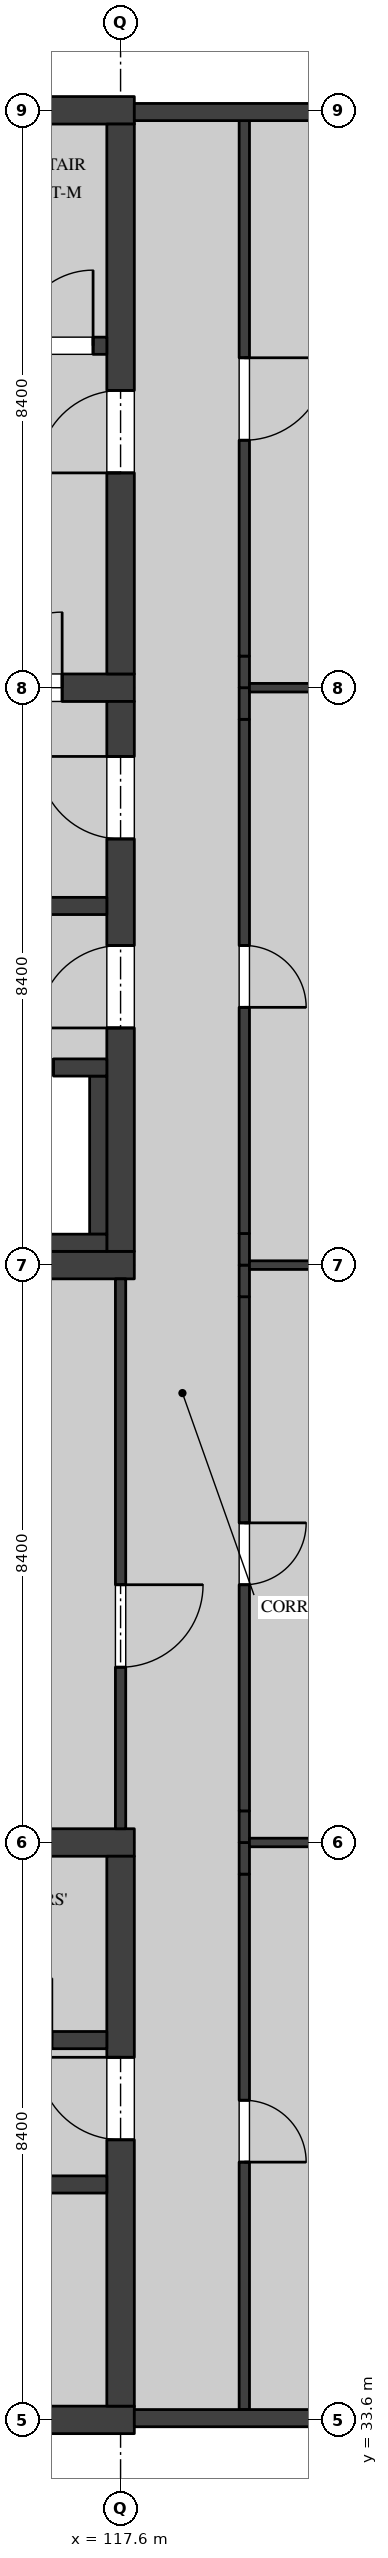
"""IFC4 building model, lengths in metres.
Left out: names, types, materials, properties, quantities, classifications, styles, units other than length and angle.
Written with IfcOpenShell. Run it as: python <this file> out.ifc"""

import sys

from ifc_helpers import new_model, si_unit, direction, frame, frame_2d, origin, place, context, subcontext, project, spatial, rectangle, extrude, element, fill, save


model = new_model("IFC4")
c1 = context("Model", 3, precision=1e-05, world=origin(), true_north=direction((0.0, 1.0)))
c2 = subcontext(c1, "Body", "Model", "MODEL_VIEW")
j1 = project(units=[si_unit("LENGTHUNIT", "METRE"), si_unit("PLANEANGLEUNIT", "RADIAN")], contexts=[c1])
p1 = place(None, origin())
s1 = spatial("IfcSite", under=j1, at=p1, CompositionType="ELEMENT")
p2 = place(p1, origin())
s2 = spatial("IfcBuilding", under=s1, at=p2, CompositionType="ELEMENT")
p3 = place(p2, frame((0.0, 0.0, 36.9)))
s3 = spatial("IfcBuildingStorey", under=s2, at=p3, CompositionType="ELEMENT", Elevation=36.9)
p4 = place(p3, frame((109.0, 50.4, 0.0), z_axis=(0.0, 0.0, 1.0), x_axis=(1.0, 0.0, 0.0)))
e1 = element("IfcWall", 1, at=p4, inside=s3, PredefinedType="SHEAR", context=c2, shape_type="SweptSolid", body=[
    extrude(rectangle(XDim=8.8, YDim=0.4, at=frame_2d((4.4, 0.0))), origin(), (0.0, 0.0, 1.0), 4.37),
])
p5 = place(p3, frame((109.0, 58.8, 0.0), z_axis=(0.0, 0.0, 1.0), x_axis=(1.0, 0.0, 0.0)))
e2 = element("IfcWall", 2, at=p5, inside=s3, PredefinedType="SHEAR", context=c2, shape_type="SweptSolid", body=[
    extrude(rectangle(XDim=8.8, YDim=0.4, at=frame_2d((4.4, 0.0))), origin(), (0.0, 0.0, 1.0), 4.37),
])
p6 = place(p5, frame((6.65, 0.0, 0.0)))
e3 = element("IfcOpeningElement", 3, at=p6, cuts=e2, PredefinedType="OPENING", context=c2, shape_type="SweptSolid", body=[
    extrude(rectangle(XDim=1.1, YDim=2.1, at=frame_2d((0.55, 1.05))), frame((0.0, 0.21, 0.0), z_axis=(0.0, -1.0, 0.0), x_axis=(1.0, 0.0, 0.0)), (0.0, 0.0, 1.0), 0.42),
])
p7 = place(p3, frame((117.6, 50.6, 0.0), z_axis=(0.0, 0.0, 1.0), x_axis=(0.0, 1.0, 0.0)))
e4 = element("IfcWall", 4, at=p7, inside=s3, PredefinedType="SHEAR", context=c2, shape_type="SweptSolid", body=[
    extrude(rectangle(XDim=8.0, YDim=0.4, at=frame_2d((4.0, 0.0))), origin(), (0.0, 0.0, 1.0), 4.37),
])
p8 = place(p7, frame((3.25, 0.0, 0.0)))
e5 = element("IfcOpeningElement", 5, at=p8, cuts=e4, PredefinedType="OPENING", context=c2, shape_type="SweptSolid", body=[
    extrude(rectangle(XDim=1.2, YDim=2.1, at=frame_2d((0.6, 1.05))), frame((0.0, 0.21, 0.0), z_axis=(0.0, -1.0, 0.0), x_axis=(1.0, 0.0, 0.0)), (0.0, 0.0, 1.0), 0.42),
])
p9 = place(p7, frame((6.0, 0.0, 0.0)))
e6 = element("IfcOpeningElement", 6, at=p9, cuts=e4, PredefinedType="OPENING", context=c2, shape_type="SweptSolid", body=[
    extrude(rectangle(XDim=1.2, YDim=2.1, at=frame_2d((0.6, 1.05))), frame((0.0, 0.21, 0.0), z_axis=(0.0, -1.0, 0.0), x_axis=(1.0, 0.0, 0.0)), (0.0, 0.0, 1.0), 0.42),
])
p10 = place(p3, frame((114.75, 55.625, 0.0), z_axis=(0.0, 0.0, 1.0), x_axis=(1.0, 0.0, 0.0)))
e7 = element("IfcWall", 7, at=p10, inside=s3, PredefinedType="SOLIDWALL", context=c2, shape_type="SweptSolid", body=[
    extrude(rectangle(XDim=2.65, YDim=0.25, at=frame_2d((1.325, 0.0))), origin(), (0.0, 0.0, 1.0), 4.37),
])
p11 = place(p3, frame((109.0, 67.2, 0.0), z_axis=(0.0, 0.0, 1.0), x_axis=(1.0, 0.0, 0.0)))
e8 = element("IfcWall", 8, at=p11, inside=s3, PredefinedType="SHEAR", context=c2, shape_type="SweptSolid", body=[
    extrude(rectangle(XDim=8.8, YDim=0.4, at=frame_2d((4.4, 0.0))), origin(), (0.0, 0.0, 1.0), 4.37),
])
p12 = place(p3, frame((117.6, 59.0, 0.0), z_axis=(0.0, 0.0, 1.0), x_axis=(0.0, 1.0, 0.0)))
e9 = element("IfcWall", 9, at=p12, inside=s3, PredefinedType="SHEAR", context=c2, shape_type="SweptSolid", body=[
    extrude(rectangle(XDim=8.0, YDim=0.4, at=frame_2d((4.0, 0.0))), origin(), (0.0, 0.0, 1.0), 4.37),
])
p13 = place(p12, frame((2.925, 0.0, 0.0)))
e10 = element("IfcOpeningElement", 10, at=p13, cuts=e9, PredefinedType="OPENING", context=c2, shape_type="SweptSolid", body=[
    extrude(rectangle(XDim=1.2, YDim=2.1, at=frame_2d((0.6, 1.05))), frame((0.0, 0.21, 0.0), z_axis=(0.0, -1.0, 0.0), x_axis=(1.0, 0.0, 0.0)), (0.0, 0.0, 1.0), 0.42),
])
p14 = place(p3, frame((117.4, 63.775, 0.0), z_axis=(0.0, 0.0, 1.0), x_axis=(-1.0, 0.0, 0.0)))
e11 = element("IfcWall", 11, at=p14, inside=s3, PredefinedType="SOLIDWALL", context=c2, shape_type="SweptSolid", body=[
    extrude(rectangle(XDim=8.0, YDim=0.25, at=frame_2d((4.0, 0.0))), origin(), (0.0, 0.0, 1.0), 4.37),
])
p15 = place(p14, frame((0.2, 0.0, 0.0)))
e12 = element("IfcOpeningElement", 12, at=p15, cuts=e11, PredefinedType="OPENING", context=c2, shape_type="SweptSolid", body=[
    extrude(rectangle(XDim=1.1, YDim=2.1, at=frame_2d((0.55, 1.05))), frame((0.0, 0.135, 0.0), z_axis=(0.0, -1.0, 0.0), x_axis=(1.0, 0.0, 0.0)), (0.0, 0.0, 1.0), 0.27),
])
for number, where, z_axis, x_axis in (
    (13, (109.0, 33.6, 0.0), (0.0, 0.0, 1.0), (1.0, 0.0, 0.0)),
    (14, (109.0, 42.0, 0.0), (0.0, 0.0, 1.0), (1.0, 0.0, 0.0)),
):
    element("IfcWall", number, at=place(p3, frame(where, z_axis=z_axis, x_axis=x_axis)), inside=s3, PredefinedType="SHEAR", context=c2, shape_type="SweptSolid", body=[
        extrude(rectangle(XDim=8.8, YDim=0.4, at=frame_2d((4.4, 0.0))), origin(), (0.0, 0.0, 1.0), 4.37),
    ])
p16 = place(p3, frame((117.6, 33.8, 0.0), z_axis=(0.0, 0.0, 1.0), x_axis=(0.0, 1.0, 0.0)))
e15 = element("IfcWall", 15, at=p16, inside=s3, PredefinedType="SHEAR", context=c2, shape_type="SweptSolid", body=[
    extrude(rectangle(XDim=8.0, YDim=0.4, at=frame_2d((4.0, 0.0))), origin(), (0.0, 0.0, 1.0), 4.37),
])
p17 = place(p16, frame((3.875, 0.0, 0.0)))
e16 = element("IfcOpeningElement", 16, at=p17, cuts=e15, PredefinedType="OPENING", context=c2, shape_type="SweptSolid", body=[
    extrude(rectangle(XDim=1.2, YDim=2.1, at=frame_2d((0.6, 1.05))), frame((0.0, 0.21, 0.0), z_axis=(0.0, -1.0, 0.0), x_axis=(1.0, 0.0, 0.0)), (0.0, 0.0, 1.0), 0.42),
])
p18 = place(p3, frame((109.4, 37.025, 0.0), z_axis=(0.0, 0.0, 1.0), x_axis=(1.0, 0.0, 0.0)))
e17 = element("IfcWall", 17, at=p18, inside=s3, PredefinedType="SOLIDWALL", context=c2, shape_type="SweptSolid", body=[
    extrude(rectangle(XDim=8.0, YDim=0.25, at=frame_2d((4.0, 0.0))), origin(), (0.0, 0.0, 1.0), 4.37),
])
p19 = place(p18, frame((0.2, 0.0, 0.0)))
e18 = element("IfcOpeningElement", 18, at=p19, cuts=e17, PredefinedType="OPENING", context=c2, shape_type="SweptSolid", body=[
    extrude(rectangle(XDim=1.1, YDim=2.1, at=frame_2d((0.55, 1.05))), frame((0.0, 0.135, 0.0), z_axis=(0.0, -1.0, 0.0), x_axis=(1.0, 0.0, 0.0)), (0.0, 0.0, 1.0), 0.27),
])
p20 = place(p3, frame((112.05, 39.125, 0.0), z_axis=(0.0, 0.0, 1.0), x_axis=(1.0, 0.0, 0.0)))
e19 = element("IfcWall", 19, at=p20, inside=s3, PredefinedType="SOLIDWALL", context=c2, shape_type="SweptSolid", body=[
    extrude(rectangle(XDim=5.35, YDim=0.25, at=frame_2d((2.675, 0.0))), origin(), (0.0, 0.0, 1.0), 4.37),
])
p21 = place(p20, frame((3.65, 0.0, 0.0)))
e20 = element("IfcOpeningElement", 20, at=p21, cuts=e19, PredefinedType="OPENING", context=c2, shape_type="SweptSolid", body=[
    extrude(rectangle(XDim=0.9, YDim=2.1, at=frame_2d((0.45, 1.05))), frame((0.0, 0.135, 0.0), z_axis=(0.0, -1.0, 0.0), x_axis=(1.0, 0.0, 0.0)), (0.0, 0.0, 1.0), 0.27),
])
p22 = place(p20, frame((0.9, 0.0, 0.0)))
e21 = element("IfcOpeningElement", 21, at=p22, cuts=e19, PredefinedType="OPENING", context=c2, shape_type="SweptSolid", body=[
    extrude(rectangle(XDim=0.8, YDim=2.1, at=frame_2d((0.4, 1.05))), frame((0.0, 0.135, 0.0), z_axis=(0.0, -1.0, 0.0), x_axis=(1.0, 0.0, 0.0)), (0.0, 0.0, 1.0), 0.27),
])
p23 = place(p3, frame((117.275, 50.85, 0.0), z_axis=(0.0, 0.0, 1.0), x_axis=(0.0, 1.0, 0.0)))
e22 = element("IfcWall", 22, at=p23, inside=s3, PredefinedType="SOLIDWALL", context=c2, shape_type="SweptSolid", body=[
    extrude(rectangle(XDim=2.3, YDim=0.25, at=frame_2d((1.15, 0.0))), origin(), (0.0, 0.0, 1.0), 4.37),
])
p24 = place(p3, frame((114.75, 53.275, 0.0), z_axis=(0.0, 0.0, 1.0), x_axis=(1.0, 0.0, 0.0)))
e23 = element("IfcWall", 23, at=p24, inside=s3, PredefinedType="SOLIDWALL", context=c2, shape_type="SweptSolid", body=[
    extrude(rectangle(XDim=2.65, YDim=0.25, at=frame_2d((1.325, 0.0))), origin(), (0.0, 0.0, 1.0), 4.37),
])
p25 = place(p24, frame((0.775, 0.0, 0.0)))
e24 = element("IfcOpeningElement", 24, at=p25, cuts=e23, PredefinedType="OPENING", context=c2, shape_type="SweptSolid", body=[
    extrude(rectangle(XDim=1.1, YDim=2.1, at=frame_2d((0.55, 1.05))), frame((0.0, 0.135, 0.0), z_axis=(0.0, -1.0, 0.0), x_axis=(1.0, 0.0, 0.0)), (0.0, 0.0, 1.0), 0.27),
])
p26 = place(p3, frame((114.75, 50.725, 0.0), z_axis=(0.0, 0.0, 1.0), x_axis=(1.0, 0.0, 0.0)))
e25 = element("IfcWall", 25, at=p26, inside=s3, PredefinedType="SOLIDWALL", context=c2, shape_type="SweptSolid", body=[
    extrude(rectangle(XDim=2.65, YDim=0.25, at=frame_2d((1.325, 0.0))), origin(), (0.0, 0.0, 1.0), 4.37),
])
p27 = place(p3, frame((119.4, 33.75, 0.0), z_axis=(0.0, 0.0, 1.0), x_axis=(0.0, 1.0, 0.0)))
e26 = element("IfcWall", 26, at=p27, inside=s3, PredefinedType="PARTITIONING", context=c2, shape_type="SweptSolid", body=[
    extrude(rectangle(XDim=7.79, YDim=0.15, at=frame_2d((3.895, 0.0))), origin(), (0.0, 0.0, 1.0), 4.37),
])
p28 = place(p27, frame((3.6, 0.0, 0.0)))
e27 = element("IfcOpeningElement", 27, at=p28, cuts=e26, PredefinedType="OPENING", context=c2, shape_type="SweptSolid", body=[
    extrude(rectangle(XDim=0.9, YDim=2.1, at=frame_2d((0.45, 1.05))), frame((0.0, 0.085, 0.0), z_axis=(0.0, -1.0, 0.0), x_axis=(1.0, 0.0, 0.0)), (0.0, 0.0, 1.0), 0.17),
])
for number, where, z_axis, x_axis in (
    (28, (119.4, 41.54, 0.0), (0.0, 0.0, 1.0), (0.0, 1.0, 0.0)),
    (29, (119.4, 42.0, 0.0), (0.0, 0.0, 1.0), (0.0, 1.0, 0.0)),
):
    element("IfcWall", number, at=place(p3, frame(where, z_axis=z_axis, x_axis=x_axis)), inside=s3, PredefinedType="PARTITIONING", context=c2, shape_type="SweptSolid", body=[
        extrude(rectangle(XDim=0.46, YDim=0.15, at=frame_2d((0.23, 0.0))), origin(), (0.0, 0.0, 1.0), 3.817),
    ])
p29 = place(p3, frame((119.4, 42.46, 0.0), z_axis=(0.0, 0.0, 1.0), x_axis=(0.0, 1.0, 0.0)))
e30 = element("IfcWall", 30, at=p29, inside=s3, PredefinedType="PARTITIONING", context=c2, shape_type="SweptSolid", body=[
    extrude(rectangle(XDim=7.48, YDim=0.15, at=frame_2d((3.74, 0.0))), origin(), (0.0, 0.0, 1.0), 4.37),
])
p30 = place(p29, frame((3.29, 0.0, 0.0)))
e31 = element("IfcOpeningElement", 31, at=p30, cuts=e30, PredefinedType="OPENING", context=c2, shape_type="SweptSolid", body=[
    extrude(rectangle(XDim=0.9, YDim=2.1, at=frame_2d((0.45, 1.05))), frame((0.0, 0.085, 0.0), z_axis=(0.0, -1.0, 0.0), x_axis=(1.0, 0.0, 0.0)), (0.0, 0.0, 1.0), 0.17),
])
p31 = place(p3, frame((119.4, 49.94, 0.0), z_axis=(0.0, 0.0, 1.0), x_axis=(0.0, 1.0, 0.0)))
e32 = element("IfcWall", 32, at=p31, inside=s3, PredefinedType="PARTITIONING", context=c2, shape_type="SweptSolid", body=[
    extrude(rectangle(XDim=0.46, YDim=0.15, at=frame_2d((0.23, 0.0))), origin(), (0.0, 0.0, 1.0), 3.817),
])
p32 = place(p3, frame((119.4, 50.4, 0.0), z_axis=(0.0, 0.0, 1.0), x_axis=(0.0, 1.0, 0.0)))
e33 = element("IfcWall", 33, at=p32, inside=s3, PredefinedType="PARTITIONING", context=c2, shape_type="SweptSolid", body=[
    extrude(rectangle(XDim=0.46, YDim=0.15, at=frame_2d((0.23, 0.0))), origin(), (0.0, 0.0, 1.0), 3.817),
])
p33 = place(p3, frame((119.4, 50.86, 0.0), z_axis=(0.0, 0.0, 1.0), x_axis=(0.0, 1.0, 0.0)))
e34 = element("IfcWall", 34, at=p33, inside=s3, PredefinedType="PARTITIONING", context=c2, shape_type="SweptSolid", body=[
    extrude(rectangle(XDim=7.48, YDim=0.15, at=frame_2d((3.74, 0.0))), origin(), (0.0, 0.0, 1.0), 4.37),
])
p34 = place(p33, frame((3.29, 0.0, 0.0)))
e35 = element("IfcOpeningElement", 35, at=p34, cuts=e34, PredefinedType="OPENING", context=c2, shape_type="SweptSolid", body=[
    extrude(rectangle(XDim=0.9, YDim=2.1, at=frame_2d((0.45, 1.05))), frame((0.0, 0.085, 0.0), z_axis=(0.0, -1.0, 0.0), x_axis=(1.0, 0.0, 0.0)), (0.0, 0.0, 1.0), 0.17),
])
for number, where, z_axis, x_axis in (
    (36, (119.4, 58.34, 0.0), (0.0, 0.0, 1.0), (0.0, 1.0, 0.0)),
    (37, (119.4, 58.8, 0.0), (0.0, 0.0, 1.0), (0.0, 1.0, 0.0)),
):
    element("IfcWall", number, at=place(p3, frame(where, z_axis=z_axis, x_axis=x_axis)), inside=s3, PredefinedType="PARTITIONING", context=c2, shape_type="SweptSolid", body=[
        extrude(rectangle(XDim=0.46, YDim=0.15, at=frame_2d((0.23, 0.0))), origin(), (0.0, 0.0, 1.0), 3.817),
    ])
p35 = place(p3, frame((119.4, 59.26, 0.0), z_axis=(0.0, 0.0, 1.0), x_axis=(0.0, 1.0, 0.0)))
e38 = element("IfcWall", 38, at=p35, inside=s3, PredefinedType="PARTITIONING", context=c2, shape_type="SweptSolid", body=[
    extrude(rectangle(XDim=7.79, YDim=0.15, at=frame_2d((3.895, 0.0))), origin(), (0.0, 0.0, 1.0), 4.37),
])
p36 = place(p35, frame((3.14, 0.0, 0.0)))
e39 = element("IfcOpeningElement", 39, at=p36, cuts=e38, PredefinedType="OPENING", context=c2, shape_type="SweptSolid", body=[
    extrude(rectangle(XDim=1.2, YDim=2.4, at=frame_2d((0.6, 1.2))), frame((0.0, 0.085, 0.0), z_axis=(0.0, -1.0, 0.0), x_axis=(1.0, 0.0, 0.0)), (0.0, 0.0, 1.0), 0.17),
])
p37 = place(p3, frame((117.6, 42.2, 0.0), z_axis=(0.0, 0.0, 1.0), x_axis=(0.0, 1.0, 0.0)))
e40 = element("IfcWall", 40, at=p37, inside=s3, PredefinedType="PARTITIONING", context=c2, shape_type="SweptSolid", body=[
    extrude(rectangle(XDim=8.0, YDim=0.15, at=frame_2d((4.0, 0.0))), origin(), (0.0, 0.0, 1.0), 3.817),
])
p38 = place(p37, frame((2.35, 0.0, 0.0)))
e41 = element("IfcOpeningElement", 41, at=p38, cuts=e40, PredefinedType="OPENING", context=c2, shape_type="SweptSolid", body=[
    extrude(rectangle(XDim=1.2, YDim=2.4, at=frame_2d((0.6, 1.2))), frame((0.0, 0.085, 0.0), z_axis=(0.0, -1.0, 0.0), x_axis=(1.0, 0.0, 0.0)), (0.0, 0.0, 1.0), 0.17),
])
for number, where, z_axis, x_axis in (
    (42, (119.475, 42.0, 0.0), (0.0, 0.0, 1.0), (1.0, 0.0, 0.0)),
    (43, (119.475, 50.4, 0.0), (0.0, 0.0, 1.0), (1.0, 0.0, 0.0)),
    (44, (119.475, 58.8, 0.0), (0.0, 0.0, 1.0), (1.0, 0.0, 0.0)),
):
    element("IfcWall", number, at=place(p3, frame(where, z_axis=z_axis, x_axis=x_axis)), inside=s3, PredefinedType="PARTITIONING", context=c2, shape_type="SweptSolid", body=[
        extrude(rectangle(XDim=6.396, YDim=0.125, at=frame_2d((3.198, 0.0))), origin(), (0.0, 0.0, 1.0), 3.817),
    ])
p39 = place(p3, frame((125.995, 67.175, 0.0), z_axis=(0.0, 0.0, 1.0), x_axis=(-1.0, 0.0, 0.0)))
e45 = element("IfcWall", 45, at=p39, inside=s3, PredefinedType="SOLIDWALL", context=c2, shape_type="SweptSolid", body=[
    extrude(rectangle(XDim=8.195, YDim=0.25, at=frame_2d((4.097, 0.0))), origin(), (0.0, 0.0, 1.0), 3.819),
])
p40 = place(p39, frame((1.195, 0.0, 0.6)))
e46 = element("IfcOpeningElement", 46, at=p40, cuts=e45, PredefinedType="OPENING", context=c2, shape_type="SweptSolid", body=[
    extrude(rectangle(XDim=1.8, YDim=2.7, at=frame_2d((0.9, 1.35))), frame((0.0, 0.135, 0.0), z_axis=(0.0, -1.0, 0.0), x_axis=(1.0, 0.0, 0.0)), (0.0, 0.0, 1.0), 0.27),
])
p41 = place(p3, frame((117.8, 33.625, 0.0), z_axis=(0.0, 0.0, 1.0), x_axis=(1.0, 0.0, 0.0)))
e47 = element("IfcWall", 47, at=p41, inside=s3, PredefinedType="SOLIDWALL", context=c2, shape_type="SweptSolid", body=[
    extrude(rectangle(XDim=8.196, YDim=0.25, at=frame_2d((4.098, 0.0))), origin(), (0.0, 0.0, 1.0), 3.819),
])
p42 = place(p41, frame((5.2, 0.0, 0.6)))
e48 = element("IfcOpeningElement", 48, at=p42, cuts=e47, PredefinedType="OPENING", context=c2, shape_type="SweptSolid", body=[
    extrude(rectangle(XDim=1.8, YDim=2.4, at=frame_2d((0.9, 1.2))), frame((0.0, 0.135, 0.0), z_axis=(0.0, -1.0, 0.0), x_axis=(1.0, 0.0, 0.0)), (0.0, 0.0, 1.0), 0.27),
])
p43 = place(p8, origin())
e49 = element("IfcDoor", 49, at=p43, inside=s3, OperationType="SINGLE_SWING_RIGHT", PredefinedType="DOOR", context=c2, shape_type="SweptSolid", body=[
    extrude(rectangle(XDim=1.2, YDim=2.1, at=frame_2d((0.6, 1.05))), frame((0.0, 0.035, 0.0), z_axis=(0.0, -1.0, 0.0), x_axis=(1.0, 0.0, 0.0)), (0.0, 0.0, 1.0), 0.07),
])
fill(e5, e49)
p44 = place(p9, origin())
e50 = element("IfcDoor", 50, at=p44, inside=s3, OperationType="SINGLE_SWING_LEFT", PredefinedType="DOOR", context=c2, shape_type="SweptSolid", body=[
    extrude(rectangle(XDim=1.2, YDim=2.1, at=frame_2d((0.6, 1.05))), frame((0.0, 0.035, 0.0), z_axis=(0.0, -1.0, 0.0), x_axis=(1.0, 0.0, 0.0)), (0.0, 0.0, 1.0), 0.07),
])
fill(e6, e50)
p45 = place(p6, origin())
e51 = element("IfcDoor", 51, at=p45, inside=s3, OperationType="SINGLE_SWING_LEFT", PredefinedType="DOOR", context=c2, shape_type="SweptSolid", body=[
    extrude(rectangle(XDim=1.1, YDim=2.1, at=frame_2d((0.55, 1.05))), frame((0.0, 0.035, 0.0), z_axis=(0.0, -1.0, 0.0), x_axis=(1.0, 0.0, 0.0)), (0.0, 0.0, 1.0), 0.07),
])
fill(e3, e51)
p46 = place(p13, origin())
e52 = element("IfcDoor", 52, at=p46, inside=s3, OperationType="SINGLE_SWING_RIGHT", PredefinedType="DOOR", context=c2, shape_type="SweptSolid", body=[
    extrude(rectangle(XDim=1.2, YDim=2.1, at=frame_2d((0.6, 1.05))), frame((0.0, 0.035, 0.0), z_axis=(0.0, -1.0, 0.0), x_axis=(1.0, 0.0, 0.0)), (0.0, 0.0, 1.0), 0.07),
])
fill(e10, e52)
p47 = place(p15, frame((1.1, 0.0, 0.0), z_axis=(0.0, 0.0, 1.0), x_axis=(-1.0, 0.0, 0.0)))
e53 = element("IfcDoor", 53, at=p47, inside=s3, OperationType="SINGLE_SWING_LEFT", PredefinedType="DOOR", context=c2, shape_type="SweptSolid", body=[
    extrude(rectangle(XDim=1.1, YDim=2.1, at=frame_2d((0.55, 1.05))), frame((0.0, 0.035, 0.0), z_axis=(0.0, -1.0, 0.0), x_axis=(1.0, 0.0, 0.0)), (0.0, 0.0, 1.0), 0.07),
])
fill(e12, e53)
p48 = place(p17, origin())
e54 = element("IfcDoor", 54, at=p48, inside=s3, OperationType="SINGLE_SWING_LEFT", PredefinedType="DOOR", context=c2, shape_type="SweptSolid", body=[
    extrude(rectangle(XDim=1.2, YDim=2.1, at=frame_2d((0.6, 1.05))), frame((0.0, 0.035, 0.0), z_axis=(0.0, -1.0, 0.0), x_axis=(1.0, 0.0, 0.0)), (0.0, 0.0, 1.0), 0.07),
])
fill(e16, e54)
p49 = place(p25, origin())
e55 = element("IfcDoor", 55, at=p49, inside=s3, OperationType="DOUBLE_DOOR_SLIDING", PredefinedType="DOOR", context=c2, shape_type="SweptSolid", body=[
    extrude(rectangle(XDim=1.1, YDim=2.1, at=frame_2d((0.55, 1.05))), frame((0.0, 0.04, 0.0), z_axis=(0.0, -1.0, 0.0), x_axis=(1.0, 0.0, 0.0)), (0.0, 0.0, 1.0), 0.08),
])
fill(e24, e55)
p50 = place(p28, frame((0.9, 0.0, 0.0), z_axis=(0.0, 0.0, 1.0), x_axis=(-1.0, 0.0, 0.0)))
e56 = element("IfcDoor", 56, at=p50, inside=s3, OperationType="SINGLE_SWING_LEFT", PredefinedType="DOOR", context=c2, shape_type="SweptSolid", body=[
    extrude(rectangle(XDim=0.9, YDim=2.1, at=frame_2d((0.45, 1.05))), frame((0.0, 0.025, 0.0), z_axis=(0.0, -1.0, 0.0), x_axis=(1.0, 0.0, 0.0)), (0.0, 0.0, 1.0), 0.05),
])
fill(e27, e56)
p51 = place(p30, frame((0.9, 0.0, 0.0), z_axis=(0.0, 0.0, 1.0), x_axis=(-1.0, 0.0, 0.0)))
e57 = element("IfcDoor", 57, at=p51, inside=s3, OperationType="SINGLE_SWING_RIGHT", PredefinedType="DOOR", context=c2, shape_type="SweptSolid", body=[
    extrude(rectangle(XDim=0.9, YDim=2.1, at=frame_2d((0.45, 1.05))), frame((0.0, 0.025, 0.0), z_axis=(0.0, -1.0, 0.0), x_axis=(1.0, 0.0, 0.0)), (0.0, 0.0, 1.0), 0.05),
])
fill(e31, e57)
p52 = place(p34, frame((0.9, 0.0, 0.0), z_axis=(0.0, 0.0, 1.0), x_axis=(-1.0, 0.0, 0.0)))
e58 = element("IfcDoor", 58, at=p52, inside=s3, OperationType="SINGLE_SWING_LEFT", PredefinedType="DOOR", context=c2, shape_type="SweptSolid", body=[
    extrude(rectangle(XDim=0.9, YDim=2.1, at=frame_2d((0.45, 1.05))), frame((0.0, 0.025, 0.0), z_axis=(0.0, -1.0, 0.0), x_axis=(1.0, 0.0, 0.0)), (0.0, 0.0, 1.0), 0.05),
])
fill(e35, e58)
p53 = place(p36, frame((1.2, 0.0, 0.0), z_axis=(0.0, 0.0, 1.0), x_axis=(-1.0, 0.0, 0.0)))
e59 = element("IfcDoor", 59, at=p53, inside=s3, OperationType="SINGLE_SWING_RIGHT", PredefinedType="DOOR", context=c2, shape_type="SweptSolid", body=[
    extrude(rectangle(XDim=1.2, YDim=2.4, at=frame_2d((0.6, 1.2))), frame((0.0, 0.025, 0.0), z_axis=(0.0, -1.0, 0.0), x_axis=(1.0, 0.0, 0.0)), (0.0, 0.0, 1.0), 0.05),
])
fill(e39, e59)
p54 = place(p38, frame((1.2, 0.0, 0.0), z_axis=(0.0, 0.0, 1.0), x_axis=(-1.0, 0.0, 0.0)))
e60 = element("IfcDoor", 60, at=p54, inside=s3, OperationType="SINGLE_SWING_RIGHT", PredefinedType="DOOR", context=c2, shape_type="SweptSolid", body=[
    extrude(rectangle(XDim=1.2, YDim=2.4, at=frame_2d((0.6, 1.2))), frame((0.0, 0.025, 0.0), z_axis=(0.0, -1.0, 0.0), x_axis=(1.0, 0.0, 0.0)), (0.0, 0.0, 1.0), 0.05),
])
fill(e41, e60)
save(model, sys.argv[1])
